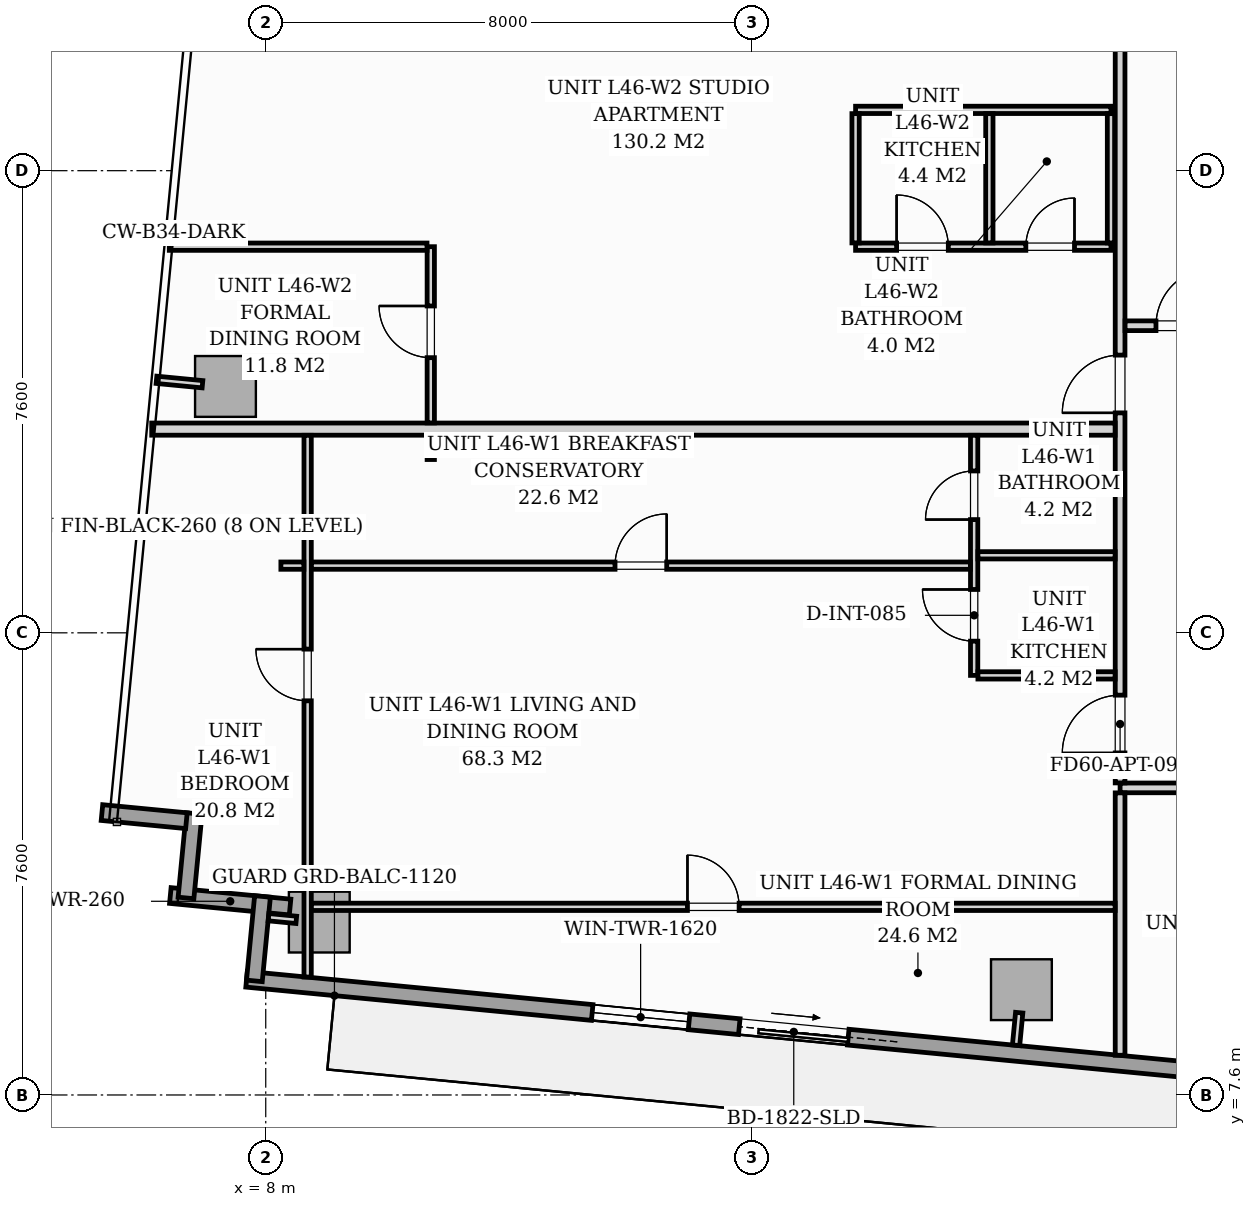
"""IFC4 building model, lengths in metres.
Left out: names, types, materials, properties, quantities, classifications, styles, units other than length and angle.
Written with IfcOpenShell. Run it as: python <this file> out.ifc"""

import sys

from ifc_helpers import new_model, si_unit, direction, frame, frame_2d, origin, origin_2d, place, context, subcontext, project, spatial, rectangle, extrude, source, transform, mapped, element, fill, save


model = new_model("IFC4")
c1 = context("Model", 3, precision=1e-05, world=origin(), true_north=direction((0.0, 1.0)))
c2 = subcontext(c1, "Body", "Model", "MODEL_VIEW")
j1 = project(units=[si_unit("LENGTHUNIT", "METRE"), si_unit("PLANEANGLEUNIT", "RADIAN")], contexts=[c1])
p1 = place(None, origin())
s1 = spatial("IfcSite", under=j1, at=p1, CompositionType="ELEMENT")
p2 = place(p1, origin())
s2 = spatial("IfcBuilding", under=s1, at=p2, CompositionType="ELEMENT")
p3 = place(p2, frame((0.0, 0.0, 159.8)))
s3 = spatial("IfcBuildingStorey", under=s2, at=p3, CompositionType="ELEMENT", Elevation=159.8)
m1 = source(origin(), c2, "Body", "SweptSolid", [
    extrude(rectangle(XDim=1.0, YDim=1.0, at=origin_2d()), origin(), (0.0, 0.0, 1.0), 3.194),
])
for number, where, z_axis, x_axis in (
    (1, (8.881, 10.443, 0.002), (0.0, 0.0, 1.0), (0.995, -0.096, 0.0)),
    (2, (20.427, 9.332, 0.002), (0.0, 0.0, 1.0), (0.995, -0.096, 0.0)),
    (3, (7.338, 19.252, 0.002), (0.0, 0.0, 1.0), (0.995, -0.096, 0.0)),
):
    element("IfcColumn", number, at=place(p3, frame(where, z_axis=z_axis, x_axis=x_axis)), inside=s3, PredefinedType="COLUMN", context=c2, shape_type="MappedRepresentation", body=[
        mapped(m1, transform((0.0, 0.0, 0.0), scale=1.0)),
    ])
p4 = place(p3, frame((8.4, 10.69, 0.0), z_axis=(0.0, 0.0, 1.0), x_axis=(-0.995391147587, 0.095898192396, 0.0)))
e4 = element("IfcWall", 4, at=p4, inside=s3, PredefinedType="STANDARD", context=c2, shape_type="SweptSolid", body=[
    extrude(rectangle(XDim=1.978, YDim=0.26, at=frame_2d((0.989, 0.0))), origin(), (0.0, 0.0, 1.0), 2.9),
])
p5 = place(p3, frame((6.688, 10.84, 0.0), z_axis=(0.0, 0.0, 1.0), x_axis=(0.09589913835, 0.995391056452, 0.0)))
e5 = element("IfcWall", 5, at=p5, inside=s3, PredefinedType="STANDARD", context=c2, shape_type="SweptSolid", body=[
    extrude(rectangle(XDim=1.395, YDim=0.26, at=frame_2d((0.698, 0.0))), origin(), (0.0, 0.0, 1.0), 2.9),
])
p6 = place(p3, frame((6.695, 12.111, 0.0), z_axis=(0.0, 0.0, 1.0), x_axis=(-0.99540614245, 0.095742423056, 0.0)))
e6 = element("IfcWall", 6, at=p6, inside=s3, PredefinedType="STANDARD", context=c2, shape_type="SweptSolid", body=[
    extrude(rectangle(XDim=1.395, YDim=0.26, at=frame_2d((0.697, 0.0))), origin(), (0.0, 0.0, 1.0), 2.9),
])
p7 = place(p3, frame((24.617, 7.873, 0.0), z_axis=(0.0, 0.0, 1.0), x_axis=(-0.995395976631, 0.095848055311, 0.0)))
e7 = element("IfcWall", 7, at=p7, inside=s3, PredefinedType="STANDARD", context=c2, shape_type="SweptSolid", body=[
    extrude(rectangle(XDim=17.01, YDim=0.26, at=frame_2d((8.505, 0.0))), origin(), (0.0, 0.0, 1.0), 2.9),
])
p8 = place(p7, frame((7.07, 0.0, 0.0)))
e8 = element("IfcOpeningElement", 8, at=p8, cuts=e7, PredefinedType="OPENING", context=c2, shape_type="SweptSolid", body=[
    extrude(rectangle(XDim=1.8, YDim=2.06, at=frame_2d((0.9, 1.03))), frame((0.0, 0.14, 0.0), z_axis=(0.0, -1.0, 0.0), x_axis=(1.0, 0.0, 0.0)), (0.0, 0.0, 1.0), 0.28),
])
p9 = place(p7, frame((9.7, 0.0, 0.65)))
e9 = element("IfcOpeningElement", 9, at=p9, cuts=e7, PredefinedType="OPENING", context=c2, shape_type="SweptSolid", body=[
    extrude(rectangle(XDim=1.6, YDim=1.5, at=frame_2d((0.8, 0.75))), frame((0.0, 0.14, 0.0), z_axis=(0.0, -1.0, 0.0), x_axis=(1.0, 0.0, 0.0)), (0.0, 0.0, 1.0), 0.28),
])
p10 = place(p3, frame((7.813, 9.476, 0.0), z_axis=(0.0, 0.0, 1.0), x_axis=(0.095915846097, 0.995389446633, 0.0)))
e10 = element("IfcWall", 10, at=p10, inside=s3, PredefinedType="STANDARD", context=c2, shape_type="SweptSolid", body=[
    extrude(rectangle(XDim=1.395, YDim=0.26, at=frame_2d((0.697, 0.0))), origin(), (0.0, 0.0, 1.0), 2.9),
])
p11 = place(p3, frame((22.05, 12.65, 0.0), z_axis=(0.0, 0.0, 1.0), x_axis=(1.0, 0.0, 0.0)))
e11 = element("IfcWall", 11, at=p11, inside=s3, PredefinedType="PARTITIONING", context=c2, shape_type="SweptSolid", body=[
    extrude(rectangle(XDim=25.65, YDim=0.16, at=frame_2d((12.825, 0.0))), origin(), (0.0, 0.0, 1.0), 2.9),
])
p12 = place(p11, frame((1.736, 0.0, 0.0)))
e12 = element("IfcOpeningElement", 12, at=p12, cuts=e11, PredefinedType="OPENING", context=c2, shape_type="SweptSolid", body=[
    extrude(rectangle(XDim=0.95, YDim=2.06, at=frame_2d((0.475, 1.03))), frame((0.0, 0.09, 0.0), z_axis=(0.0, -1.0, 0.0), x_axis=(1.0, 0.0, 0.0)), (0.0, 0.0, 1.0), 0.18),
])
p13 = place(p11, frame((10.3, 0.0, 0.0)))
e13 = element("IfcOpeningElement", 13, at=p13, cuts=e11, PredefinedType="OPENING", context=c2, shape_type="SweptSolid", body=[
    extrude(rectangle(XDim=0.95, YDim=2.06, at=frame_2d((0.475, 1.03))), frame((0.0, 0.09, 0.0), z_axis=(0.0, -1.0, 0.0), x_axis=(1.0, 0.0, 0.0)), (0.0, 0.0, 1.0), 0.18),
])
p14 = place(p11, frame((22.965, 0.0, 0.0)))
e14 = element("IfcOpeningElement", 14, at=p14, cuts=e11, PredefinedType="OPENING", context=c2, shape_type="SweptSolid", body=[
    extrude(rectangle(XDim=0.95, YDim=2.06, at=frame_2d((0.475, 1.03))), frame((0.0, 0.09, 0.0), z_axis=(0.0, -1.0, 0.0), x_axis=(1.0, 0.0, 0.0)), (0.0, 0.0, 1.0), 0.18),
])
p15 = place(p3, frame((22.05, 8.253, 0.0), z_axis=(0.0, 0.0, 1.0), x_axis=(0.0, 1.0, 0.0)))
e15 = element("IfcWall", 15, at=p15, inside=s3, PredefinedType="PARTITIONING", context=c2, shape_type="SweptSolid", body=[
    extrude(rectangle(XDim=4.315, YDim=0.16, at=frame_2d((2.157, 0.0))), origin(), (0.0, 0.0, 1.0), 2.9),
])
p16 = place(p3, frame((22.05, 12.732, 0.0), z_axis=(0.0, 0.0, 1.0), x_axis=(0.0, 1.0, 0.0)))
e16 = element("IfcWall", 16, at=p16, inside=s3, PredefinedType="PARTITIONING", context=c2, shape_type="SweptSolid", body=[
    extrude(rectangle(XDim=14.685, YDim=0.16, at=frame_2d((7.343, 0.0))), origin(), (0.0, 0.0, 1.0), 2.9),
])
p17 = place(p16, frame((0.493, 0.0, 0.0)))
e17 = element("IfcOpeningElement", 17, at=p17, cuts=e16, PredefinedType="OPENING", context=c2, shape_type="SweptSolid", body=[
    extrude(rectangle(XDim=0.95, YDim=2.06, at=frame_2d((0.475, 1.03))), frame((0.0, 0.09, 0.0), z_axis=(0.0, -1.0, 0.0), x_axis=(1.0, 0.0, 0.0)), (0.0, 0.0, 1.0), 0.18),
])
p18 = place(p16, frame((6.085, 0.0, 0.0)))
e18 = element("IfcOpeningElement", 18, at=p18, cuts=e16, PredefinedType="OPENING", context=c2, shape_type="SweptSolid", body=[
    extrude(rectangle(XDim=0.95, YDim=2.06, at=frame_2d((0.475, 1.03))), frame((0.0, 0.09, 0.0), z_axis=(0.0, -1.0, 0.0), x_axis=(1.0, 0.0, 0.0)), (0.0, 0.0, 1.0), 0.18),
])
p19 = place(p3, frame((6.125, 18.55, 0.0), z_axis=(0.0, 0.0, 1.0), x_axis=(1.0, 0.0, 0.0)))
e19 = element("IfcWall", 19, at=p19, inside=s3, PredefinedType="PARTITIONING", context=c2, shape_type="SweptSolid", body=[
    extrude(rectangle(XDim=15.843, YDim=0.2, at=frame_2d((7.921, 0.0))), origin(), (0.0, 0.0, 1.0), 2.023),
])
p20 = place(p3, frame((19.65, 14.5, 0.0), z_axis=(0.0, 0.0, 1.0), x_axis=(0.0, 1.0, 0.0)))
e20 = element("IfcWall", 20, at=p20, inside=s3, PredefinedType="PARTITIONING", context=c2, shape_type="SweptSolid", body=[
    extrude(rectangle(XDim=3.948, YDim=0.12, at=frame_2d((1.974, 0.0))), origin(), (0.0, 0.0, 1.0), 2.9),
])
p21 = place(p20, frame((0.563, 0.0, 0.0)))
e21 = element("IfcOpeningElement", 21, at=p21, cuts=e20, PredefinedType="OPENING", context=c2, shape_type="SweptSolid", body=[
    extrude(rectangle(XDim=0.85, YDim=2.05, at=frame_2d((0.425, 1.025))), frame((0.0, 0.07, 0.0), z_axis=(0.0, -1.0, 0.0), x_axis=(1.0, 0.0, 0.0)), (0.0, 0.0, 1.0), 0.14),
])
p22 = place(p20, frame((2.562, 0.0, 0.0)))
e22 = element("IfcOpeningElement", 22, at=p22, cuts=e20, PredefinedType="OPENING", context=c2, shape_type="SweptSolid", body=[
    extrude(rectangle(XDim=0.8, YDim=2.0, at=frame_2d((0.4, 1.0))), frame((0.0, 0.07, 0.0), z_axis=(0.0, -1.0, 0.0), x_axis=(1.0, 0.0, 0.0)), (0.0, 0.0, 1.0), 0.14),
])
for number, where, z_axis, x_axis in (
    (23, (19.712, 16.475, 0.0), (0.0, 0.0, 1.0), (1.0, 0.0, 0.0)),
    (24, (19.712, 14.5, 0.0), (0.0, 0.0, 1.0), (1.0, 0.0, 0.0)),
):
    element("IfcWall", number, at=place(p3, frame(where, z_axis=z_axis, x_axis=x_axis)), inside=s3, PredefinedType="PARTITIONING", context=c2, shape_type="SweptSolid", body=[
        extrude(rectangle(XDim=2.256, YDim=0.12, at=frame_2d((1.128, 0.0))), origin(), (0.0, 0.0, 1.0), 2.9),
    ])
p23 = place(p3, frame((8.689, 9.54, 0.0), z_axis=(0.0, 0.0, 1.0), x_axis=(0.0, 1.0, 0.0)))
e25 = element("IfcWall", 25, at=p23, inside=s3, PredefinedType="PARTITIONING", context=c2, shape_type="SweptSolid", body=[
    extrude(rectangle(XDim=8.908, YDim=0.12, at=frame_2d((4.454, 0.0))), origin(), (0.0, 0.0, 1.0), 2.343),
])
p24 = place(p23, frame((4.542, 0.0, 0.0)))
e26 = element("IfcOpeningElement", 26, at=p24, cuts=e25, PredefinedType="OPENING", context=c2, shape_type="SweptSolid", body=[
    extrude(rectangle(XDim=0.85, YDim=2.05, at=frame_2d((0.425, 1.025))), frame((0.0, 0.07, 0.0), z_axis=(0.0, -1.0, 0.0), x_axis=(1.0, 0.0, 0.0)), (0.0, 0.0, 1.0), 0.14),
])
p25 = place(p3, frame((8.751, 10.694, 0.0), z_axis=(0.0, 0.0, 1.0), x_axis=(1.0, 0.0, 0.0)))
e27 = element("IfcWall", 27, at=p25, inside=s3, PredefinedType="PARTITIONING", context=c2, shape_type="SweptSolid", body=[
    extrude(rectangle(XDim=13.217, YDim=0.12, at=frame_2d((6.608, 0.0))), origin(), (0.0, 0.0, 1.0), 2.9),
])
p26 = place(p25, frame((6.184, 0.0, 0.0)))
e28 = element("IfcOpeningElement", 28, at=p26, cuts=e27, PredefinedType="OPENING", context=c2, shape_type="SweptSolid", body=[
    extrude(rectangle(XDim=0.85, YDim=2.05, at=frame_2d((0.425, 1.025))), frame((0.0, 0.07, 0.0), z_axis=(0.0, -1.0, 0.0), x_axis=(1.0, 0.0, 0.0)), (0.0, 0.0, 1.0), 0.14),
])
p27 = place(p3, frame((8.249, 16.305, 0.0), z_axis=(0.0, 0.0, 1.0), x_axis=(1.0, 0.0, 0.0)))
e29 = element("IfcWall", 29, at=p27, inside=s3, PredefinedType="PARTITIONING", context=c2, shape_type="SweptSolid", body=[
    extrude(rectangle(XDim=0.378, YDim=0.12, at=frame_2d((0.189, 0.0))), origin(), (0.0, 0.0, 1.0), 2.9),
])
p28 = place(p3, frame((8.751, 16.305, 0.0), z_axis=(0.0, 0.0, 1.0), x_axis=(1.0, 0.0, 0.0)))
e30 = element("IfcWall", 30, at=p28, inside=s3, PredefinedType="PARTITIONING", context=c2, shape_type="SweptSolid", body=[
    extrude(rectangle(XDim=10.837, YDim=0.12, at=frame_2d((5.418, 0.0))), origin(), (0.0, 0.0, 1.0), 2.9),
])
p29 = place(p28, frame((4.993, 0.0, 0.0)))
e31 = element("IfcOpeningElement", 31, at=p29, cuts=e30, PredefinedType="OPENING", context=c2, shape_type="SweptSolid", body=[
    extrude(rectangle(XDim=0.85, YDim=2.05, at=frame_2d((0.425, 1.025))), frame((0.0, 0.07, 0.0), z_axis=(0.0, -1.0, 0.0), x_axis=(1.0, 0.0, 0.0)), (0.0, 0.0, 1.0), 0.14),
])
p30 = place(p3, frame((17.7, 21.55, 0.0), z_axis=(0.0, 0.0, 1.0), x_axis=(1.0, 0.0, 0.0)))
e32 = element("IfcWall", 32, at=p30, inside=s3, PredefinedType="PARTITIONING", context=c2, shape_type="SweptSolid", body=[
    extrude(rectangle(XDim=4.2, YDim=0.12, at=frame_2d((2.1, 0.0))), origin(), (0.0, 0.0, 1.0), 2.9),
])
p31 = place(p30, frame((0.675, 0.0, 0.0)))
e33 = element("IfcOpeningElement", 33, at=p31, cuts=e32, PredefinedType="OPENING", context=c2, shape_type="SweptSolid", body=[
    extrude(rectangle(XDim=0.85, YDim=2.05, at=frame_2d((0.425, 1.025))), frame((0.0, 0.07, 0.0), z_axis=(0.0, -1.0, 0.0), x_axis=(1.0, 0.0, 0.0)), (0.0, 0.0, 1.0), 0.14),
])
p32 = place(p30, frame((2.8, 0.0, 0.0)))
e34 = element("IfcOpeningElement", 34, at=p32, cuts=e32, PredefinedType="OPENING", context=c2, shape_type="SweptSolid", body=[
    extrude(rectangle(XDim=0.8, YDim=2.0, at=frame_2d((0.4, 1.0))), frame((0.0, 0.07, 0.0), z_axis=(0.0, -1.0, 0.0), x_axis=(1.0, 0.0, 0.0)), (0.0, 0.0, 1.0), 0.14),
])
p33 = place(p3, frame((17.7, 23.8, 0.0), z_axis=(0.0, 0.0, 1.0), x_axis=(1.0, 0.0, 0.0)))
e35 = element("IfcWall", 35, at=p33, inside=s3, PredefinedType="PARTITIONING", context=c2, shape_type="SweptSolid", body=[
    extrude(rectangle(XDim=4.2, YDim=0.12, at=frame_2d((2.1, 0.0))), origin(), (0.0, 0.0, 1.0), 2.9),
])
for number, where, z_axis, x_axis in (
    (36, (17.7, 21.612, 0.0), (0.0, 0.0, 1.0), (0.0, 1.0, 0.0)),
    (37, (19.9, 21.612, 0.0), (0.0, 0.0, 1.0), (0.0, 1.0, 0.0)),
    (38, (21.9, 21.612, 0.0), (0.0, 0.0, 1.0), (0.0, 1.0, 0.0)),
):
    element("IfcWall", number, at=place(p3, frame(where, z_axis=z_axis, x_axis=x_axis)), inside=s3, PredefinedType="PARTITIONING", context=c2, shape_type="SweptSolid", body=[
        extrude(rectangle(XDim=2.126, YDim=0.12, at=frame_2d((1.063, 0.0))), origin(), (0.0, 0.0, 1.0), 2.9),
    ])
p34 = place(p3, frame((10.714, 18.05, 0.0), z_axis=(0.0, 0.0, 1.0), x_axis=(0.0, 1.0, 0.0)))
e39 = element("IfcWall", 39, at=p34, inside=s3, PredefinedType="PARTITIONING", context=c2, shape_type="SweptSolid", body=[
    extrude(rectangle(XDim=0.398, YDim=0.12, at=frame_2d((0.199, 0.0))), origin(), (0.0, 0.0, 1.0), 2.9),
])
p35 = place(p3, frame((10.714, 18.652, 0.0), z_axis=(0.0, 0.0, 1.0), x_axis=(0.0, 1.0, 0.0)))
e40 = element("IfcWall", 40, at=p35, inside=s3, PredefinedType="PARTITIONING", context=c2, shape_type="SweptSolid", body=[
    extrude(rectangle(XDim=2.898, YDim=0.12, at=frame_2d((1.449, 0.0))), origin(), (0.0, 0.0, 1.0), 2.9),
])
p36 = place(p35, frame((1.073, 0.0, 0.0)))
e41 = element("IfcOpeningElement", 41, at=p36, cuts=e40, PredefinedType="OPENING", context=c2, shape_type="SweptSolid", body=[
    extrude(rectangle(XDim=0.85, YDim=2.05, at=frame_2d((0.425, 1.025))), frame((0.0, 0.07, 0.0), z_axis=(0.0, -1.0, 0.0), x_axis=(1.0, 0.0, 0.0)), (0.0, 0.0, 1.0), 0.14),
])
p37 = place(p3, frame((6.414, 21.55, 0.0), z_axis=(0.0, 0.0, 1.0), x_axis=(1.0, 0.0, 0.0)))
e42 = element("IfcWall", 42, at=p37, inside=s3, PredefinedType="PARTITIONING", context=c2, shape_type="SweptSolid", body=[
    extrude(rectangle(XDim=4.238, YDim=0.12, at=frame_2d((2.119, 0.0))), origin(), (0.0, 0.0, 1.0), 2.9),
])
p38 = place(p3, frame((22.132, 20.25, 0.0), z_axis=(0.0, 0.0, 1.0), x_axis=(1.0, 0.0, 0.0)))
e43 = element("IfcWall", 43, at=p38, inside=s3, PredefinedType="PARTITIONING", context=c2, shape_type="SweptSolid", body=[
    extrude(rectangle(XDim=1.886, YDim=0.16, at=frame_2d((0.943, 0.0))), origin(), (0.0, 0.0, 1.0), 2.9),
])
p39 = place(p38, frame((0.508, 0.0, 0.0)))
e44 = element("IfcOpeningElement", 44, at=p39, cuts=e43, PredefinedType="OPENING", context=c2, shape_type="SweptSolid", body=[
    extrude(rectangle(XDim=0.95, YDim=2.06, at=frame_2d((0.475, 1.03))), frame((0.0, 0.09, 0.0), z_axis=(0.0, -1.0, 0.0), x_axis=(1.0, 0.0, 0.0)), (0.0, 0.0, 1.0), 0.18),
])
p40 = place(p3, frame((8.502, 10.48, 0.0), z_axis=(0.0, 0.0, 1.0), x_axis=(-0.995384576284, 0.09596637586, 0.0)))
e45 = element("IfcWall", 45, at=p40, inside=s3, PredefinedType="PARTITIONING", context=c2, shape_type="SweptSolid", body=[
    extrude(rectangle(XDim=0.458, YDim=0.12, at=frame_2d((0.229, 0.0))), origin(), (0.0, 0.0, 1.0), 2.9),
])
p41 = place(p3, frame((20.391, 8.953, 0.0), z_axis=(0.0, 0.0, 1.0), x_axis=(-0.096222656154, -0.995359834654, 0.0)))
e46 = element("IfcWall", 46, at=p41, inside=s3, PredefinedType="PARTITIONING", context=c2, shape_type="SweptSolid", body=[
    extrude(rectangle(XDim=0.538, YDim=0.12, at=frame_2d((0.269, 0.0))), origin(), (0.0, 0.0, 1.0), 2.9),
])
p42 = place(p3, frame((6.959, 19.288, 0.0), z_axis=(0.0, 0.0, 1.0), x_axis=(-0.995377786728, 0.096036772582, 0.0)))
e47 = element("IfcWall", 47, at=p42, inside=s3, PredefinedType="PARTITIONING", context=c2, shape_type="SweptSolid", body=[
    extrude(rectangle(XDim=0.76, YDim=0.12, at=frame_2d((0.38, 0.0))), origin(), (0.0, 0.0, 1.0), 2.9),
])
m2 = source(origin(), c2, "Body", "SweptSolid", [
    extrude(rectangle(XDim=1.8, YDim=2.06, at=frame_2d((0.9, 1.03))), frame((0.0, 0.025, 0.0), z_axis=(0.0, -1.0, 0.0), x_axis=(1.0, 0.0, 0.0)), (0.0, 0.0, 1.0), 0.05),
])
p43 = place(p8, origin())
e48 = element("IfcDoor", 48, at=p43, inside=s3, OperationType="SLIDING_TO_LEFT", PredefinedType="DOOR", context=c2, shape_type="MappedRepresentation", body=[
    mapped(m2, transform((0.0, 0.0, 0.0), scale=1.0)),
])
fill(e8, e48)
m3 = source(origin(), c2, "Body", "SweptSolid", [
    extrude(rectangle(XDim=1.6, YDim=1.5, at=frame_2d((0.8, 0.75))), frame((0.0, 0.03, 0.0), z_axis=(0.0, -1.0, 0.0), x_axis=(1.0, 0.0, 0.0)), (0.0, 0.0, 1.0), 0.06),
])
p44 = place(p9, origin())
e49 = element("IfcWindow", 49, at=p44, inside=s3, PartitioningType="SINGLE_PANEL", PredefinedType="WINDOW", context=c2, shape_type="MappedRepresentation", body=[
    mapped(m3, transform((0.0, 0.0, 0.0), scale=1.0)),
])
fill(e9, e49)
m4 = source(origin(), c2, "Body", "SweptSolid", [
    extrude(rectangle(XDim=0.95, YDim=2.06, at=frame_2d((0.475, 1.03))), frame((0.0, 0.025, 0.0), z_axis=(0.0, -1.0, 0.0), x_axis=(1.0, 0.0, 0.0)), (0.0, 0.0, 1.0), 0.05),
])
p45 = place(p17, origin())
e50 = element("IfcDoor", 50, at=p45, inside=s3, OperationType="SINGLE_SWING_LEFT", PredefinedType="DOOR", context=c2, shape_type="MappedRepresentation", body=[
    mapped(m4, transform((0.0, 0.0, 0.0), scale=1.0)),
])
fill(e17, e50)
m5 = source(origin(), c2, "Body", "SweptSolid", [
    extrude(rectangle(XDim=0.85, YDim=2.05, at=frame_2d((0.425, 1.025))), frame((0.0, 0.025, 0.0), z_axis=(0.0, -1.0, 0.0), x_axis=(1.0, 0.0, 0.0)), (0.0, 0.0, 1.0), 0.05),
])
p46 = place(p21, origin())
e51 = element("IfcDoor", 51, at=p46, inside=s3, OperationType="SINGLE_SWING_RIGHT", PredefinedType="DOOR", context=c2, shape_type="MappedRepresentation", body=[
    mapped(m5, transform((0.0, 0.0, 0.0), scale=1.0)),
])
fill(e21, e51)
m6 = source(origin(), c2, "Body", "SweptSolid", [
    extrude(rectangle(XDim=0.8, YDim=2.0, at=frame_2d((0.4, 1.0))), frame((0.0, 0.025, 0.0), z_axis=(0.0, -1.0, 0.0), x_axis=(1.0, 0.0, 0.0)), (0.0, 0.0, 1.0), 0.05),
])
p47 = place(p22, origin())
e52 = element("IfcDoor", 52, at=p47, inside=s3, OperationType="SINGLE_SWING_LEFT", PredefinedType="DOOR", context=c2, shape_type="MappedRepresentation", body=[
    mapped(m6, transform((0.0, 0.0, 0.0), scale=1.0)),
])
fill(e22, e52)
p48 = place(p24, origin())
e53 = element("IfcDoor", 53, at=p48, inside=s3, OperationType="SINGLE_SWING_RIGHT", PredefinedType="DOOR", context=c2, shape_type="MappedRepresentation", body=[
    mapped(m5, transform((0.0, 0.0, 0.0), scale=1.0)),
])
fill(e26, e53)
p49 = place(p26, origin())
e54 = element("IfcDoor", 54, at=p49, inside=s3, OperationType="SINGLE_SWING_LEFT", PredefinedType="DOOR", context=c2, shape_type="MappedRepresentation", body=[
    mapped(m5, transform((0.0, 0.0, 0.0), scale=1.0)),
])
fill(e28, e54)
p50 = place(p29, origin())
e55 = element("IfcDoor", 55, at=p50, inside=s3, OperationType="SINGLE_SWING_RIGHT", PredefinedType="DOOR", context=c2, shape_type="MappedRepresentation", body=[
    mapped(m5, transform((0.0, 0.0, 0.0), scale=1.0)),
])
fill(e31, e55)
p51 = place(p18, origin())
e56 = element("IfcDoor", 56, at=p51, inside=s3, OperationType="SINGLE_SWING_LEFT", PredefinedType="DOOR", context=c2, shape_type="MappedRepresentation", body=[
    mapped(m4, transform((0.0, 0.0, 0.0), scale=1.0)),
])
fill(e18, e56)
p52 = place(p36, origin())
e57 = element("IfcDoor", 57, at=p52, inside=s3, OperationType="SINGLE_SWING_RIGHT", PredefinedType="DOOR", context=c2, shape_type="MappedRepresentation", body=[
    mapped(m5, transform((0.0, 0.0, 0.0), scale=1.0)),
])
fill(e41, e57)
p53 = place(p31, origin())
e58 = element("IfcDoor", 58, at=p53, inside=s3, OperationType="SINGLE_SWING_LEFT", PredefinedType="DOOR", context=c2, shape_type="MappedRepresentation", body=[
    mapped(m5, transform((0.0, 0.0, 0.0), scale=1.0)),
])
fill(e33, e58)
p54 = place(p32, origin())
e59 = element("IfcDoor", 59, at=p54, inside=s3, OperationType="SINGLE_SWING_RIGHT", PredefinedType="DOOR", context=c2, shape_type="MappedRepresentation", body=[
    mapped(m6, transform((0.0, 0.0, 0.0), scale=1.0)),
])
fill(e34, e59)
p55 = place(p39, origin())
e60 = element("IfcDoor", 60, at=p55, inside=s3, OperationType="SINGLE_SWING_RIGHT", PredefinedType="DOOR", context=c2, shape_type="MappedRepresentation", body=[
    mapped(m4, transform((0.0, 0.0, 0.0), scale=1.0)),
])
fill(e44, e60)
save(model, sys.argv[1])
